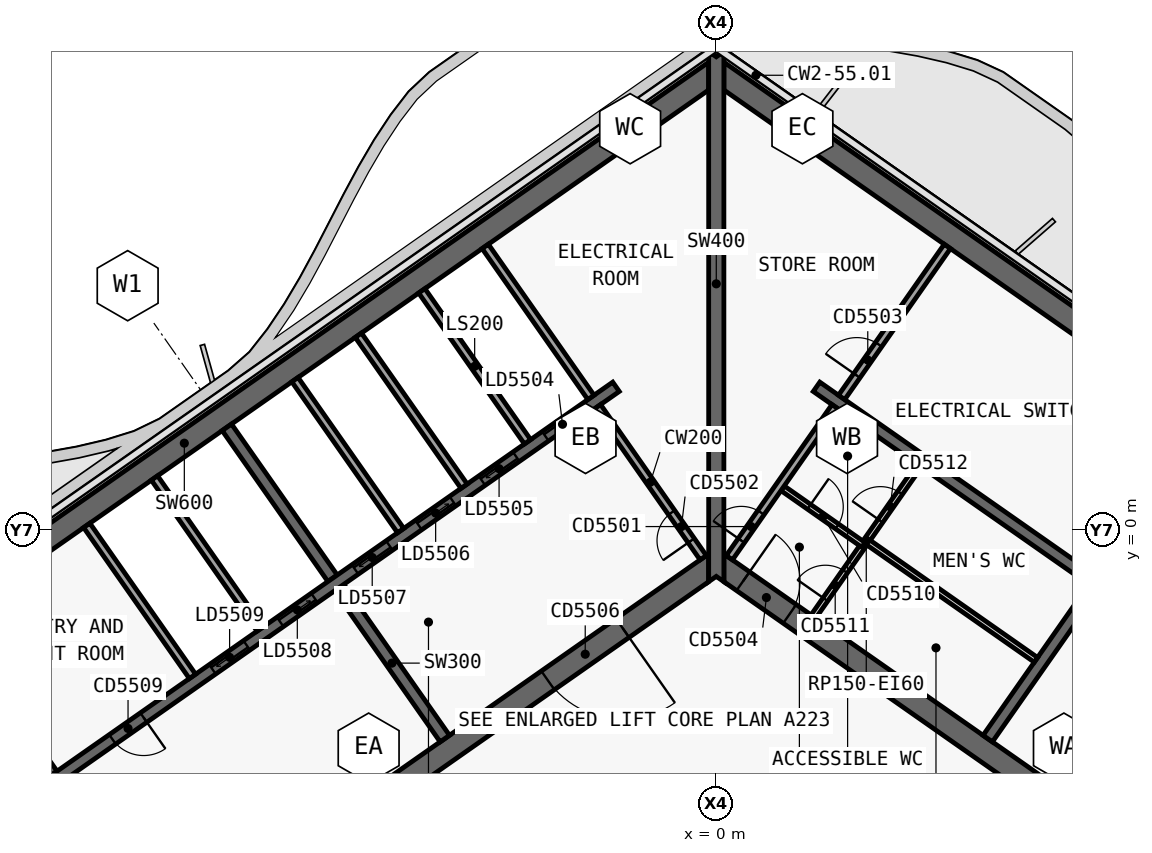
"""IFC4 building model, lengths in metres.
Left out: names, types, materials, properties, quantities, classifications, styles, units other than length and angle.
Written with IfcOpenShell. Run it as: python <this file> out.ifc"""

import sys

from ifc_helpers import new_model, si_unit, direction, frame, frame_2d, origin, place, context, subcontext, project, spatial, polyline, rectangle, outline, extrude, element, fill, save


model = new_model("IFC4")
c1 = context("Model", 3, precision=1e-05, world=origin(), true_north=direction((0.0, 1.0)))
c2 = subcontext(c1, "Body", "Model", "MODEL_VIEW")
j1 = project(units=[si_unit("LENGTHUNIT", "METRE"), si_unit("PLANEANGLEUNIT", "RADIAN")], contexts=[c1])
p1 = place(None, origin())
s1 = spatial("IfcSite", under=j1, at=p1, CompositionType="ELEMENT")
p2 = place(p1, origin())
s2 = spatial("IfcBuilding", under=s1, at=p2, CompositionType="ELEMENT")
p3 = place(p2, frame((0.0, 0.0, 307.3)))
s3 = spatial("IfcBuildingStorey", under=s2, at=p3, CompositionType="ELEMENT", Elevation=307.3)
p4 = place(p3, frame((-0.028, 12.066, 0.0), z_axis=(0.0, 0.0, 1.0), x_axis=(-0.819151382952, -0.573577380837, 0.0)))
e1 = element("IfcWall", 1, at=p4, inside=s3, PredefinedType="SHEAR", context=c2, shape_type="SweptSolid", body=[
    extrude(outline(polyline([(33.898, 0.3), (0.42, 0.3), (0.0, -0.3), (33.898, -0.3), (33.898, 0.3)])), origin(), (0.0, 0.0, 1.0), 6.0),
])
p5 = place(p3, frame((-0.028, -0.874, 0.0), z_axis=(0.0, 0.0, 1.0), x_axis=(-0.819150035022, -0.573579305871, 0.0)))
e2 = element("IfcWall", 2, at=p5, inside=s3, PredefinedType="SHEAR", context=c2, shape_type="SweptSolid", body=[
    extrude(outline(polyline([(26.476, 0.3), (0.42, 0.3), (0.0, -0.3), (26.476, -0.3), (26.476, 0.3)])), origin(), (0.0, 0.0, 1.0), 6.0),
])
p6 = place(p5, frame((2.976, 0.0, 0.0)))
e3 = element("IfcOpeningElement", 3, at=p6, cuts=e2, PredefinedType="OPENING", context=c2, shape_type="SweptSolid", body=[
    extrude(rectangle(XDim=2.4, YDim=2.1, at=frame_2d((1.2, 1.05))), frame((0.0, 0.31, 0.0), z_axis=(0.0, -1.0, 0.0), x_axis=(1.0, 0.0, 0.0)), (0.0, 0.0, 1.0), 0.62),
])
p7 = place(p5, frame((11.776, 0.0, 0.0)))
e4 = element("IfcOpeningElement", 4, at=p7, cuts=e2, PredefinedType="OPENING", context=c2, shape_type="SweptSolid", body=[
    extrude(rectangle(XDim=2.4, YDim=2.1, at=frame_2d((1.2, 1.05))), frame((0.0, 0.31, 0.0), z_axis=(0.0, -1.0, 0.0), x_axis=(1.0, 0.0, 0.0)), (0.0, 0.0, 1.0), 0.62),
])
p8 = place(p3, frame((-7.143, -5.49, 0.0), z_axis=(0.0, 0.0, 1.0), x_axis=(-0.573617744349, 0.819123118565, 0.0)))
e5 = element("IfcWall", 5, at=p8, inside=s3, PredefinedType="SHEAR", context=c2, shape_type="SweptSolid", body=[
    extrude(outline(polyline([(4.85, 0.15), (0.0, 0.15), (0.0, -0.15), (4.85, -0.15), (4.85, 0.15)])), origin(), (0.0, 0.0, 1.0), 6.0),
])
p9 = place(p3, frame((-10.097, -1.271, 0.0), z_axis=(0.0, 0.0, 1.0), x_axis=(-0.573560315113, 0.819163332265, 0.0)))
e6 = element("IfcWall", 6, at=p9, inside=s3, PredefinedType="SHEAR", context=c2, shape_type="SweptSolid", body=[
    extrude(outline(polyline([(4.85, -0.15), (4.85, 0.15), (0.0, 0.15), (0.0, -0.15), (4.85, -0.15)])), origin(), (0.0, 0.0, 1.0), 6.0),
])
p10 = place(p3, frame((-17.469, -6.433, 0.0), z_axis=(0.0, 0.0, 1.0), x_axis=(-0.573594092424, 0.81913968109, 0.0)))
e7 = element("IfcWall", 7, at=p10, inside=s3, PredefinedType="SHEAR", context=c2, shape_type="SweptSolid", body=[
    extrude(outline(polyline([(4.85, -0.15), (4.85, 0.15), (0.0, 0.15), (0.0, -0.15), (4.85, -0.15)])), origin(), (0.0, 0.0, 1.0), 6.0),
])
p11 = place(p3, frame((-2.638, 3.768, 0.0), z_axis=(0.0, 0.0, 1.0), x_axis=(-0.819155014212, -0.573572194837, 0.0)))
e8 = element("IfcWall", 8, at=p11, inside=s3, PredefinedType="SHEAR", context=c2, shape_type="SweptSolid", body=[
    extrude(outline(polyline([(26.4, 0.15), (0.0, 0.15), (0.0, -0.15), (26.4, -0.15), (26.4, 0.15)])), origin(), (0.0, 0.0, 1.0), 6.0),
])
p12 = place(p11, frame((1.169, 0.0, 0.0)))
e9 = element("IfcOpeningElement", 9, at=p12, cuts=e8, PredefinedType="OPENING", context=c2, shape_type="SweptSolid", body=[
    extrude(rectangle(XDim=1.1, YDim=2.1, at=frame_2d((0.55, 1.05))), frame((0.0, 0.16, 0.0), z_axis=(0.0, -1.0, 0.0), x_axis=(1.0, 0.0, 0.0)), (0.0, 0.0, 1.0), 0.32),
])
p13 = place(p11, frame((3.206, 0.0, 0.0)))
e10 = element("IfcOpeningElement", 10, at=p13, cuts=e8, PredefinedType="OPENING", context=c2, shape_type="SweptSolid", body=[
    extrude(rectangle(XDim=1.1, YDim=2.1, at=frame_2d((0.55, 1.05))), frame((0.0, 0.16, 0.0), z_axis=(0.0, -1.0, 0.0), x_axis=(1.0, 0.0, 0.0)), (0.0, 0.0, 1.0), 0.32),
])
p14 = place(p11, frame((5.244, 0.0, 0.0)))
e11 = element("IfcOpeningElement", 11, at=p14, cuts=e8, PredefinedType="OPENING", context=c2, shape_type="SweptSolid", body=[
    extrude(rectangle(XDim=1.1, YDim=2.1, at=frame_2d((0.55, 1.05))), frame((0.0, 0.16, 0.0), z_axis=(0.0, -1.0, 0.0), x_axis=(1.0, 0.0, 0.0)), (0.0, 0.0, 1.0), 0.32),
])
p15 = place(p11, frame((7.281, 0.0, 0.0)))
e12 = element("IfcOpeningElement", 12, at=p15, cuts=e8, PredefinedType="OPENING", context=c2, shape_type="SweptSolid", body=[
    extrude(rectangle(XDim=1.1, YDim=2.1, at=frame_2d((0.55, 1.05))), frame((0.0, 0.16, 0.0), z_axis=(0.0, -1.0, 0.0), x_axis=(1.0, 0.0, 0.0)), (0.0, 0.0, 1.0), 0.32),
])
p16 = place(p11, frame((9.688, 0.0, 0.0)))
e13 = element("IfcOpeningElement", 13, at=p16, cuts=e8, PredefinedType="OPENING", context=c2, shape_type="SweptSolid", body=[
    extrude(rectangle(XDim=1.1, YDim=2.1, at=frame_2d((0.55, 1.05))), frame((0.0, 0.16, 0.0), z_axis=(0.0, -1.0, 0.0), x_axis=(1.0, 0.0, 0.0)), (0.0, 0.0, 1.0), 0.32),
])
p17 = place(p11, frame((11.863, 0.0, 0.0)))
e14 = element("IfcOpeningElement", 14, at=p17, cuts=e8, PredefinedType="OPENING", context=c2, shape_type="SweptSolid", body=[
    extrude(rectangle(XDim=1.1, YDim=2.1, at=frame_2d((0.55, 1.05))), frame((0.0, 0.16, 0.0), z_axis=(0.0, -1.0, 0.0), x_axis=(1.0, 0.0, 0.0)), (0.0, 0.0, 1.0), 0.32),
])
p18 = place(p11, frame((15.175, 0.0, 0.0)))
e15 = element("IfcOpeningElement", 15, at=p18, cuts=e8, PredefinedType="OPENING", context=c2, shape_type="SweptSolid", body=[
    extrude(rectangle(XDim=1.0, YDim=2.1, at=frame_2d((0.5, 1.05))), frame((0.0, 0.16, 0.0), z_axis=(0.0, -1.0, 0.0), x_axis=(1.0, 0.0, 0.0)), (0.0, 0.0, 1.0), 0.32),
])
p19 = place(p3, frame((0.028, 12.066, 0.0), z_axis=(0.0, 0.0, 1.0), x_axis=(0.819151382952, -0.573577380837, 0.0)))
e16 = element("IfcWall", 16, at=p19, inside=s3, PredefinedType="SHEAR", context=c2, shape_type="SweptSolid", body=[
    extrude(outline(polyline([(33.898, 0.3), (0.0, 0.3), (0.42, -0.3), (33.898, -0.3), (33.898, 0.3)])), origin(), (0.0, 0.0, 1.0), 6.0),
])
p20 = place(p3, frame((0.028, -0.874, 0.0), z_axis=(0.0, 0.0, 1.0), x_axis=(0.819150035022, -0.573579305871, 0.0)))
e17 = element("IfcWall", 17, at=p20, inside=s3, PredefinedType="SHEAR", context=c2, shape_type="SweptSolid", body=[
    extrude(outline(polyline([(26.476, 0.3), (0.0, 0.3), (0.42, -0.3), (26.476, -0.3), (26.476, 0.3)])), origin(), (0.0, 0.0, 1.0), 6.0),
])
p21 = place(p20, frame((0.826, 0.0, 0.0)))
e18 = element("IfcOpeningElement", 18, at=p21, cuts=e17, PredefinedType="OPENING", context=c2, shape_type="SweptSolid", body=[
    extrude(rectangle(XDim=1.5, YDim=2.1, at=frame_2d((0.75, 1.05))), frame((0.0, 0.31, 0.0), z_axis=(0.0, -1.0, 0.0), x_axis=(1.0, 0.0, 0.0)), (0.0, 0.0, 1.0), 0.62),
])
p22 = place(p20, frame((12.226, 0.0, 0.0)))
e19 = element("IfcOpeningElement", 19, at=p22, cuts=e17, PredefinedType="OPENING", context=c2, shape_type="SweptSolid", body=[
    extrude(rectangle(XDim=1.5, YDim=2.1, at=frame_2d((0.75, 1.05))), frame((0.0, 0.31, 0.0), z_axis=(0.0, -1.0, 0.0), x_axis=(1.0, 0.0, 0.0)), (0.0, 0.0, 1.0), 0.62),
])
p23 = place(p3, frame((7.143, -5.49, 0.0), z_axis=(0.0, 0.0, 1.0), x_axis=(0.573617744349, 0.819123118565, 0.0)))
e20 = element("IfcWall", 20, at=p23, inside=s3, PredefinedType="SHEAR", context=c2, shape_type="SweptSolid", body=[
    extrude(outline(polyline([(0.0, 0.15), (0.0, -0.15), (4.85, -0.15), (4.85, 0.15), (0.0, 0.15)])), origin(), (0.0, 0.0, 1.0), 6.0),
])
p24 = place(p3, frame((2.638, 3.768, 0.0), z_axis=(0.0, 0.0, 1.0), x_axis=(0.819155014212, -0.573572194837, 0.0)))
e21 = element("IfcWall", 21, at=p24, inside=s3, PredefinedType="SHEAR", context=c2, shape_type="SweptSolid", body=[
    extrude(outline(polyline([(0.0, 0.15), (0.0, -0.15), (26.4, -0.15), (26.4, 0.15), (0.0, 0.15)])), origin(), (0.0, 0.0, 1.0), 6.0),
])
p25 = place(p24, frame((9.637, 0.0, 0.0)))
e22 = element("IfcOpeningElement", 22, at=p25, cuts=e21, PredefinedType="OPENING", context=c2, shape_type="SweptSolid", body=[
    extrude(rectangle(XDim=1.2, YDim=2.1, at=frame_2d((0.6, 1.05))), frame((0.0, 0.16, 0.0), z_axis=(0.0, -1.0, 0.0), x_axis=(1.0, 0.0, 0.0)), (0.0, 0.0, 1.0), 0.32),
])
p26 = place(p24, frame((11.812, 0.0, 0.0)))
e23 = element("IfcOpeningElement", 23, at=p26, cuts=e21, PredefinedType="OPENING", context=c2, shape_type="SweptSolid", body=[
    extrude(rectangle(XDim=1.2, YDim=2.1, at=frame_2d((0.6, 1.05))), frame((0.0, 0.16, 0.0), z_axis=(0.0, -1.0, 0.0), x_axis=(1.0, 0.0, 0.0)), (0.0, 0.0, 1.0), 0.32),
])
p27 = place(p24, frame((13.988, 0.0, 0.0)))
e24 = element("IfcOpeningElement", 24, at=p27, cuts=e21, PredefinedType="OPENING", context=c2, shape_type="SweptSolid", body=[
    extrude(rectangle(XDim=1.2, YDim=2.1, at=frame_2d((0.6, 1.05))), frame((0.0, 0.16, 0.0), z_axis=(0.0, -1.0, 0.0), x_axis=(1.0, 0.0, 0.0)), (0.0, 0.0, 1.0), 0.32),
])
p28 = place(p24, frame((16.262, 0.0, 0.0)))
e25 = element("IfcOpeningElement", 25, at=p28, cuts=e21, PredefinedType="OPENING", context=c2, shape_type="SweptSolid", body=[
    extrude(rectangle(XDim=1.0, YDim=2.1, at=frame_2d((0.5, 1.05))), frame((0.0, 0.16, 0.0), z_axis=(0.0, -1.0, 0.0), x_axis=(1.0, 0.0, 0.0)), (0.0, 0.0, 1.0), 0.32),
])
p29 = place(p3, frame((0.0, -1.361, 0.0), z_axis=(0.0, 0.0, 1.0), x_axis=(0.0, 1.0, 0.0)))
e26 = element("IfcWall", 26, at=p29, inside=s3, PredefinedType="SHEAR", context=c2, shape_type="SweptSolid", body=[
    extrude(outline(polyline([(0.14, 0.2), (0.0, 0.2), (0.14, 0.0), (0.0, -0.2), (0.14, -0.2), (1.012, -0.2), (12.94, -0.2), (13.813, -0.2), (13.893, -0.2), (13.933, -0.172), (13.813, 0.0), (13.933, 0.172), (13.893, 0.2), (13.813, 0.2), (12.94, 0.2), (1.012, 0.2), (0.14, 0.2)])), origin(), (0.0, 0.0, 1.0), 6.0),
])
p30 = place(p3, frame((-4.967, 2.321, 0.0), z_axis=(0.0, 0.0, 1.0), x_axis=(-0.573594092424, 0.81913968109, 0.0)))
e27 = element("IfcWall", 27, at=p30, inside=s3, PredefinedType="SOLIDWALL", context=c2, shape_type="SweptSolid", body=[
    extrude(rectangle(XDim=4.85, YDim=0.2, at=frame_2d((2.425, 0.0))), origin(), (0.0, 0.0, 1.0), 6.0),
])
p31 = place(p3, frame((-6.636, 1.152, 0.0), z_axis=(0.0, 0.0, 1.0), x_axis=(-0.573560315113, 0.819163332265, 0.0)))
e28 = element("IfcWall", 28, at=p31, inside=s3, PredefinedType="SOLIDWALL", context=c2, shape_type="SweptSolid", body=[
    extrude(rectangle(XDim=4.85, YDim=0.2, at=frame_2d((2.425, 0.0))), origin(), (0.0, 0.0, 1.0), 6.0),
])
p32 = place(p3, frame((-8.305, -0.017, 0.0), z_axis=(0.0, 0.0, 1.0), x_axis=(-0.573594092424, 0.81913968109, 0.0)))
e29 = element("IfcWall", 29, at=p32, inside=s3, PredefinedType="SOLIDWALL", context=c2, shape_type="SweptSolid", body=[
    extrude(rectangle(XDim=4.85, YDim=0.2, at=frame_2d((2.425, 0.0))), origin(), (0.0, 0.0, 1.0), 6.0),
])
p33 = place(p3, frame((-12.001, -2.605, 0.0), z_axis=(0.0, 0.0, 1.0), x_axis=(-0.573560315113, 0.819163332265, 0.0)))
e30 = element("IfcWall", 30, at=p33, inside=s3, PredefinedType="SOLIDWALL", context=c2, shape_type="SweptSolid", body=[
    extrude(rectangle(XDim=4.85, YDim=0.2, at=frame_2d((2.425, 0.0))), origin(), (0.0, 0.0, 1.0), 6.0),
])
p34 = place(p3, frame((-13.783, -3.852, 0.0), z_axis=(0.0, 0.0, 1.0), x_axis=(-0.573594092424, 0.81913968109, 0.0)))
e31 = element("IfcWall", 31, at=p34, inside=s3, PredefinedType="SOLIDWALL", context=c2, shape_type="SweptSolid", body=[
    extrude(rectangle(XDim=4.85, YDim=0.2, at=frame_2d((2.425, 0.0))), origin(), (0.0, 0.0, 1.0), 6.0),
])
p35 = place(p3, frame((2.556, -2.278, 0.0), z_axis=(0.0, 0.0, 1.0), x_axis=(0.573560315113, 0.819163332265, 0.0)))
e32 = element("IfcWall", 32, at=p35, inside=s3, PredefinedType="PARTITIONING", context=c2, shape_type="SweptSolid", body=[
    extrude(rectangle(XDim=4.85, YDim=0.15, at=frame_2d((2.425, 0.0))), origin(), (0.0, 0.0, 1.0), 5.72),
])
p36 = place(p35, frame((0.55, 0.0, 0.0)))
e33 = element("IfcOpeningElement", 33, at=p36, cuts=e32, PredefinedType="OPENING", context=c2, shape_type="SweptSolid", body=[
    extrude(rectangle(XDim=0.9, YDim=2.1, at=frame_2d((0.45, 1.05))), frame((0.0, 0.085, 0.0), z_axis=(0.0, -1.0, 0.0), x_axis=(1.0, 0.0, 0.0)), (0.0, 0.0, 1.0), 0.17),
])
p37 = place(p35, frame((3.075, 0.0, 0.0)))
e34 = element("IfcOpeningElement", 34, at=p37, cuts=e32, PredefinedType="OPENING", context=c2, shape_type="SweptSolid", body=[
    extrude(rectangle(XDim=0.9, YDim=2.1, at=frame_2d((0.45, 1.05))), frame((0.0, 0.085, 0.0), z_axis=(0.0, -1.0, 0.0), x_axis=(1.0, 0.0, 0.0)), (0.0, 0.0, 1.0), 0.17),
])
p38 = place(p3, frame((1.745, 1.097, 0.0), z_axis=(0.0, 0.0, 1.0), x_axis=(0.819178980414, -0.573537965655, 0.0)))
e35 = element("IfcWall", 35, at=p38, inside=s3, PredefinedType="PARTITIONING", context=c2, shape_type="SweptSolid", body=[
    extrude(rectangle(XDim=2.6, YDim=0.15, at=frame_2d((1.3, 0.0))), origin(), (0.0, 0.0, 1.0), 5.72),
])
p39 = place(p38, frame((0.85, 0.0, 0.0)))
e36 = element("IfcOpeningElement", 36, at=p39, cuts=e35, PredefinedType="OPENING", context=c2, shape_type="SweptSolid", body=[
    extrude(rectangle(XDim=0.9, YDim=2.1, at=frame_2d((0.45, 1.05))), frame((0.0, 0.085, 0.0), z_axis=(0.0, -1.0, 0.0), x_axis=(1.0, 0.0, 0.0)), (0.0, 0.0, 1.0), 0.17),
])
p40 = place(p3, frame((3.947, -0.292, 0.0), z_axis=(0.0, 0.0, 1.0), x_axis=(0.819151939971, -0.573576585332, 0.0)))
e37 = element("IfcWall", 37, at=p40, inside=s3, PredefinedType="PARTITIONING", context=c2, shape_type="SweptSolid", body=[
    extrude(rectangle(XDim=5.45, YDim=0.15, at=frame_2d((2.725, 0.0))), origin(), (0.0, 0.0, 1.0), 5.72),
])
p41 = place(p3, frame((-0.344, -0.729, 0.0), z_axis=(0.0, 0.0, 1.0), x_axis=(-0.573560315113, 0.819163332265, 0.0)))
e38 = element("IfcWall", 38, at=p41, inside=s3, PredefinedType="SOLIDWALL", context=c2, shape_type="SweptSolid", body=[
    extrude(rectangle(XDim=4.85, YDim=0.2, at=frame_2d((2.425, 0.0))), origin(), (0.0, 0.0, 1.0), 5.72),
])
p42 = place(p41, frame((0.55, 0.0, 0.0)))
e39 = element("IfcOpeningElement", 39, at=p42, cuts=e38, PredefinedType="OPENING", context=c2, shape_type="SweptSolid", body=[
    extrude(rectangle(XDim=0.9, YDim=2.1, at=frame_2d((0.45, 1.05))), frame((0.0, 0.11, 0.0), z_axis=(0.0, -1.0, 0.0), x_axis=(1.0, 0.0, 0.0)), (0.0, 0.0, 1.0), 0.22),
])
p43 = place(p3, frame((-3.298, 3.49, 0.0), z_axis=(0.0, 0.0, 1.0), x_axis=(-0.573560315113, 0.819163332265, 0.0)))
e40 = element("IfcWall", 40, at=p43, inside=s3, PredefinedType="SOLIDWALL", context=c2, shape_type="SweptSolid", body=[
    extrude(rectangle(XDim=4.85, YDim=0.2, at=frame_2d((2.425, 0.0))), origin(), (0.0, 0.0, 1.0), 5.72),
])
p44 = place(p3, frame((0.344, -0.729, 0.0), z_axis=(0.0, 0.0, 1.0), x_axis=(0.573560315113, 0.819163332265, 0.0)))
e41 = element("IfcWall", 41, at=p44, inside=s3, PredefinedType="SOLIDWALL", context=c2, shape_type="SweptSolid", body=[
    extrude(rectangle(XDim=4.85, YDim=0.2, at=frame_2d((2.425, 0.0))), origin(), (0.0, 0.0, 1.0), 5.72),
])
p45 = place(p44, frame((0.55, 0.0, 0.0)))
e42 = element("IfcOpeningElement", 42, at=p45, cuts=e41, PredefinedType="OPENING", context=c2, shape_type="SweptSolid", body=[
    extrude(rectangle(XDim=0.9, YDim=2.1, at=frame_2d((0.45, 1.05))), frame((0.0, 0.11, 0.0), z_axis=(0.0, -1.0, 0.0), x_axis=(1.0, 0.0, 0.0)), (0.0, 0.0, 1.0), 0.22),
])
p46 = place(p3, frame((3.298, 3.49, 0.0), z_axis=(0.0, 0.0, 1.0), x_axis=(0.573560315113, 0.819163332265, 0.0)))
e43 = element("IfcWall", 43, at=p46, inside=s3, PredefinedType="SOLIDWALL", context=c2, shape_type="SweptSolid", body=[
    extrude(rectangle(XDim=4.85, YDim=0.2, at=frame_2d((2.425, 0.0))), origin(), (0.0, 0.0, 1.0), 5.72),
])
p47 = place(p46, frame((0.7, 0.0, 0.0)))
e44 = element("IfcOpeningElement", 44, at=p47, cuts=e43, PredefinedType="OPENING", context=c2, shape_type="SweptSolid", body=[
    extrude(rectangle(XDim=1.0, YDim=2.1, at=frame_2d((0.5, 1.05))), frame((0.0, 0.11, 0.0), z_axis=(0.0, -1.0, 0.0), x_axis=(1.0, 0.0, 0.0)), (0.0, 0.0, 1.0), 0.22),
])
p48 = place(p12, origin())
e45 = element("IfcDoor", 45, at=p48, inside=s3, OperationType="SLIDING_TO_LEFT", PredefinedType="DOOR", context=c2, shape_type="SweptSolid", body=[
    extrude(rectangle(XDim=1.1, YDim=2.1, at=frame_2d((0.55, 1.05))), frame((0.0, 0.025, 0.0), z_axis=(0.0, -1.0, 0.0), x_axis=(1.0, 0.0, 0.0)), (0.0, 0.0, 1.0), 0.05),
])
fill(e9, e45)
p49 = place(p13, origin())
e46 = element("IfcDoor", 46, at=p49, inside=s3, OperationType="SLIDING_TO_RIGHT", PredefinedType="DOOR", context=c2, shape_type="SweptSolid", body=[
    extrude(rectangle(XDim=1.1, YDim=2.1, at=frame_2d((0.55, 1.05))), frame((0.0, 0.025, 0.0), z_axis=(0.0, -1.0, 0.0), x_axis=(1.0, 0.0, 0.0)), (0.0, 0.0, 1.0), 0.05),
])
fill(e10, e46)
p50 = place(p14, origin())
e47 = element("IfcDoor", 47, at=p50, inside=s3, OperationType="SLIDING_TO_LEFT", PredefinedType="DOOR", context=c2, shape_type="SweptSolid", body=[
    extrude(rectangle(XDim=1.1, YDim=2.1, at=frame_2d((0.55, 1.05))), frame((0.0, 0.025, 0.0), z_axis=(0.0, -1.0, 0.0), x_axis=(1.0, 0.0, 0.0)), (0.0, 0.0, 1.0), 0.05),
])
fill(e11, e47)
p51 = place(p15, origin())
e48 = element("IfcDoor", 48, at=p51, inside=s3, OperationType="SLIDING_TO_RIGHT", PredefinedType="DOOR", context=c2, shape_type="SweptSolid", body=[
    extrude(rectangle(XDim=1.1, YDim=2.1, at=frame_2d((0.55, 1.05))), frame((0.0, 0.025, 0.0), z_axis=(0.0, -1.0, 0.0), x_axis=(1.0, 0.0, 0.0)), (0.0, 0.0, 1.0), 0.05),
])
fill(e12, e48)
p52 = place(p16, origin())
e49 = element("IfcDoor", 49, at=p52, inside=s3, OperationType="SLIDING_TO_LEFT", PredefinedType="DOOR", context=c2, shape_type="SweptSolid", body=[
    extrude(rectangle(XDim=1.1, YDim=2.1, at=frame_2d((0.55, 1.05))), frame((0.0, 0.025, 0.0), z_axis=(0.0, -1.0, 0.0), x_axis=(1.0, 0.0, 0.0)), (0.0, 0.0, 1.0), 0.05),
])
fill(e13, e49)
p53 = place(p17, origin())
e50 = element("IfcDoor", 50, at=p53, inside=s3, OperationType="SLIDING_TO_RIGHT", PredefinedType="DOOR", context=c2, shape_type="SweptSolid", body=[
    extrude(rectangle(XDim=1.1, YDim=2.1, at=frame_2d((0.55, 1.05))), frame((0.0, 0.025, 0.0), z_axis=(0.0, -1.0, 0.0), x_axis=(1.0, 0.0, 0.0)), (0.0, 0.0, 1.0), 0.05),
])
fill(e14, e50)
p54 = place(p18, origin())
e51 = element("IfcDoor", 51, at=p54, inside=s3, OperationType="SINGLE_SWING_RIGHT", PredefinedType="DOOR", context=c2, shape_type="SweptSolid", body=[
    extrude(rectangle(XDim=1.0, YDim=2.1, at=frame_2d((0.5, 1.05))), frame((0.0, 0.025, 0.0), z_axis=(0.0, -1.0, 0.0), x_axis=(1.0, 0.0, 0.0)), (0.0, 0.0, 1.0), 0.05),
])
fill(e15, e51)
p55 = place(p6, origin())
e52 = element("IfcDoor", 52, at=p55, inside=s3, OperationType="DOUBLE_DOOR_SINGLE_SWING", PredefinedType="DOOR", context=c2, shape_type="SweptSolid", body=[
    extrude(rectangle(XDim=2.4, YDim=2.1, at=frame_2d((1.2, 1.05))), frame((0.0, 0.025, 0.0), z_axis=(0.0, -1.0, 0.0), x_axis=(1.0, 0.0, 0.0)), (0.0, 0.0, 1.0), 0.05),
])
fill(e3, e52)
p56 = place(p36, origin())
e53 = element("IfcDoor", 53, at=p56, inside=s3, OperationType="SINGLE_SWING_RIGHT", PredefinedType="DOOR", context=c2, shape_type="SweptSolid", body=[
    extrude(rectangle(XDim=0.9, YDim=2.1, at=frame_2d((0.45, 1.05))), frame((0.0, 0.025, 0.0), z_axis=(0.0, -1.0, 0.0), x_axis=(1.0, 0.0, 0.0)), (0.0, 0.0, 1.0), 0.05),
])
fill(e33, e53)
p57 = place(p39, origin())
e54 = element("IfcDoor", 54, at=p57, inside=s3, OperationType="SINGLE_SWING_RIGHT", PredefinedType="DOOR", context=c2, shape_type="SweptSolid", body=[
    extrude(rectangle(XDim=0.9, YDim=2.1, at=frame_2d((0.45, 1.05))), frame((0.0, 0.025, 0.0), z_axis=(0.0, -1.0, 0.0), x_axis=(1.0, 0.0, 0.0)), (0.0, 0.0, 1.0), 0.05),
])
fill(e36, e54)
p58 = place(p37, origin())
e55 = element("IfcDoor", 55, at=p58, inside=s3, OperationType="SINGLE_SWING_RIGHT", PredefinedType="DOOR", context=c2, shape_type="SweptSolid", body=[
    extrude(rectangle(XDim=0.9, YDim=2.1, at=frame_2d((0.45, 1.05))), frame((0.0, 0.025, 0.0), z_axis=(0.0, -1.0, 0.0), x_axis=(1.0, 0.0, 0.0)), (0.0, 0.0, 1.0), 0.05),
])
fill(e34, e55)
p59 = place(p21, origin())
e56 = element("IfcDoor", 56, at=p59, inside=s3, OperationType="SINGLE_SWING_RIGHT", PredefinedType="DOOR", context=c2, shape_type="SweptSolid", body=[
    extrude(rectangle(XDim=1.5, YDim=2.1, at=frame_2d((0.75, 1.05))), frame((0.0, 0.025, 0.0), z_axis=(0.0, -1.0, 0.0), x_axis=(1.0, 0.0, 0.0)), (0.0, 0.0, 1.0), 0.05),
])
fill(e18, e56)
p60 = place(p42, origin())
e57 = element("IfcDoor", 57, at=p60, inside=s3, OperationType="SINGLE_SWING_RIGHT", PredefinedType="DOOR", context=c2, shape_type="SweptSolid", body=[
    extrude(rectangle(XDim=0.9, YDim=2.1, at=frame_2d((0.45, 1.05))), frame((0.0, 0.025, 0.0), z_axis=(0.0, -1.0, 0.0), x_axis=(1.0, 0.0, 0.0)), (0.0, 0.0, 1.0), 0.05),
])
fill(e39, e57)
p61 = place(p45, origin())
e58 = element("IfcDoor", 58, at=p61, inside=s3, OperationType="SINGLE_SWING_RIGHT", PredefinedType="DOOR", context=c2, shape_type="SweptSolid", body=[
    extrude(rectangle(XDim=0.9, YDim=2.1, at=frame_2d((0.45, 1.05))), frame((0.0, 0.025, 0.0), z_axis=(0.0, -1.0, 0.0), x_axis=(1.0, 0.0, 0.0)), (0.0, 0.0, 1.0), 0.05),
])
fill(e42, e58)
p62 = place(p47, origin())
e59 = element("IfcDoor", 59, at=p62, inside=s3, OperationType="SINGLE_SWING_RIGHT", PredefinedType="DOOR", context=c2, shape_type="SweptSolid", body=[
    extrude(rectangle(XDim=1.0, YDim=2.1, at=frame_2d((0.5, 1.05))), frame((0.0, 0.025, 0.0), z_axis=(0.0, -1.0, 0.0), x_axis=(1.0, 0.0, 0.0)), (0.0, 0.0, 1.0), 0.05),
])
fill(e44, e59)
save(model, sys.argv[1])
